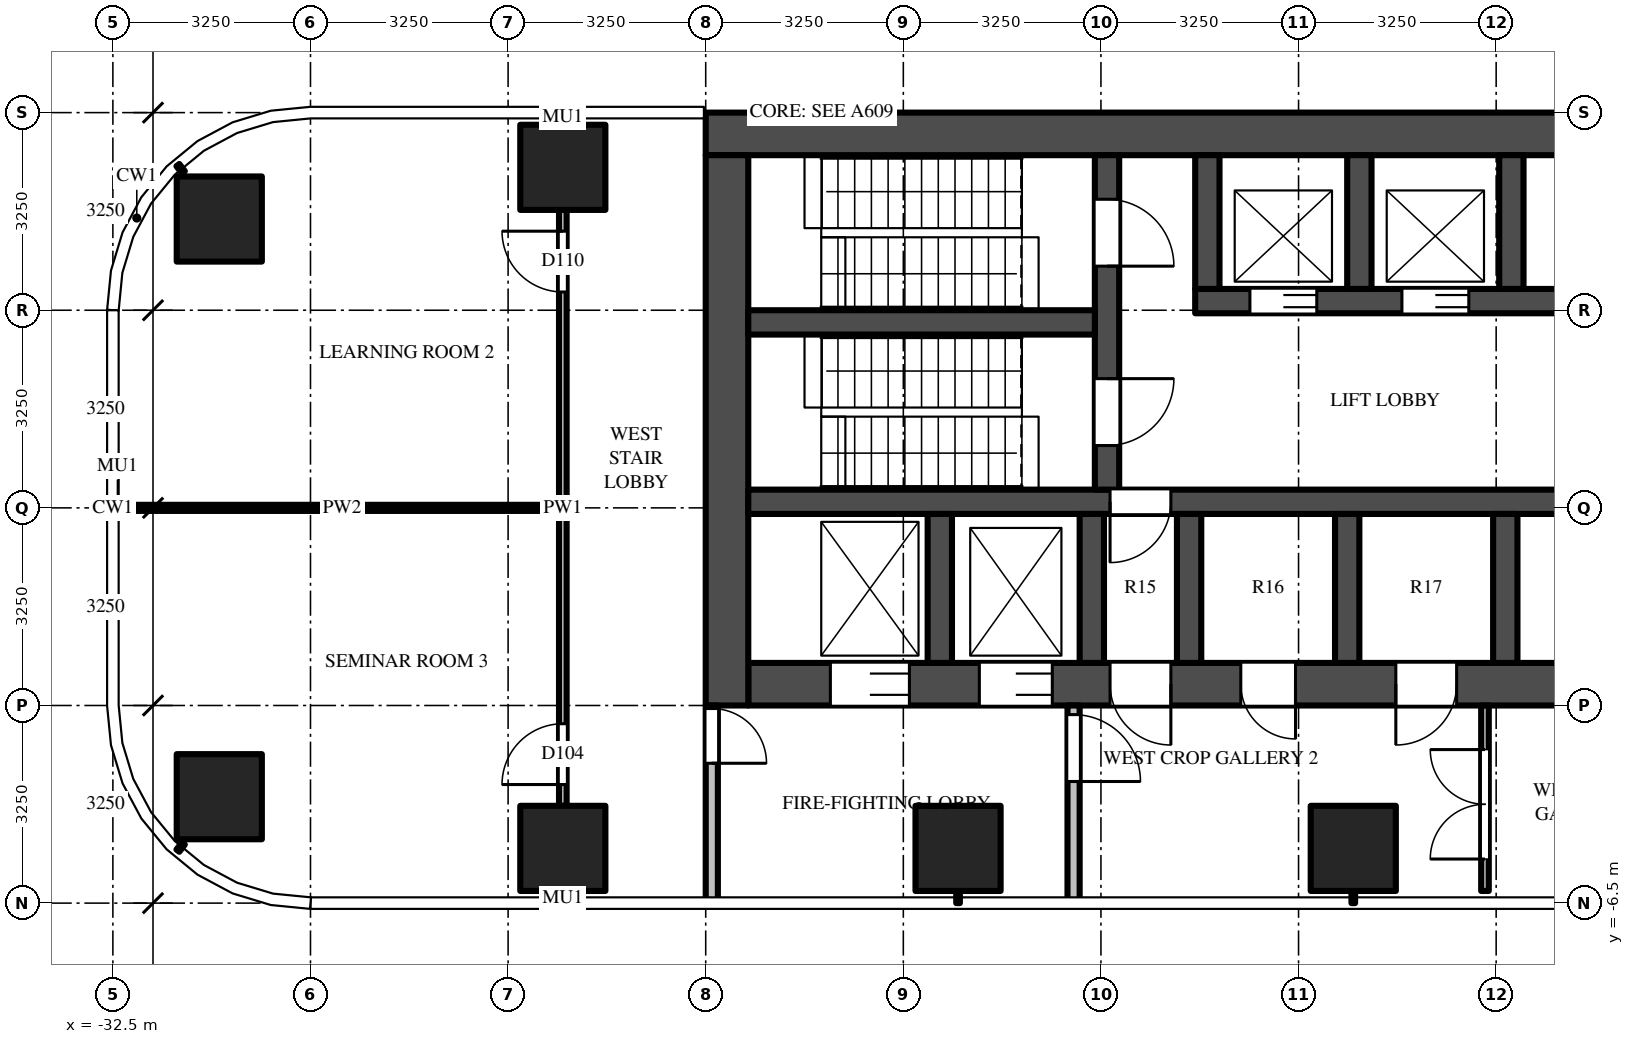
"""IFC4 building model, lengths in metres.
Left out: names, types, materials, properties, quantities, classifications, styles, units other than length and angle.
Written with IfcOpenShell. Run it as: python <this file> out.ifc"""

import sys

from ifc_helpers import new_model, si_unit, direction, frame, frame_2d, origin, origin_2d, place, context, subcontext, project, spatial, polyline, rectangle, outline, extrude, source, transform, mapped, element, fill, save


model = new_model("IFC4")
c1 = context("Model", 3, precision=1e-05, world=origin(), true_north=direction((0.0, 1.0)))
c2 = subcontext(c1, "Body", "Model", "MODEL_VIEW")
j1 = project(units=[si_unit("LENGTHUNIT", "METRE"), si_unit("PLANEANGLEUNIT", "RADIAN")], contexts=[c1])
p1 = place(None, origin())
s1 = spatial("IfcSite", under=j1, at=p1, CompositionType="ELEMENT")
p2 = place(p1, origin())
s2 = spatial("IfcBuilding", under=s1, at=p2, CompositionType="ELEMENT")
p3 = place(p2, frame((0.0, 0.0, 65.5)))
s3 = spatial("IfcBuildingStorey", under=s2, at=p3, CompositionType="ELEMENT", Elevation=65.5)
m1 = source(origin(), c2, "Body", "SweptSolid", [
    extrude(rectangle(XDim=1.4, YDim=1.4, at=origin_2d()), origin(), (0.0, 0.0, 1.0), 4.5),
])
for number, where, z_axis, x_axis in (
    (1, (-12.1, -5.6, 0.0), (0.0, 0.0, 1.0), (1.0, 0.0, 0.0)),
    (2, (-18.6, -5.6, 0.0), (0.0, 0.0, 1.0), (1.0, 0.0, 0.0)),
    (3, (-25.1, -5.6, 0.0), (0.0, 0.0, 1.0), (1.0, 0.0, 0.0)),
    (4, (-30.75, -4.75, 0.0), (0.0, 0.0, 1.0), (1.0, 0.0, 0.0)),
    (5, (-25.1, 5.6, 0.0), (0.0, 0.0, 1.0), (1.0, 0.0, 0.0)),
    (6, (-30.75, 4.75, 0.0), (0.0, 0.0, 1.0), (1.0, 0.0, 0.0)),
):
    element("IfcColumn", number, at=place(p3, frame(where, z_axis=z_axis, x_axis=x_axis)), inside=s3, PredefinedType="COLUMN", context=c2, shape_type="MappedRepresentation", body=[
        mapped(m1, transform((0.0, 0.0, 0.0))),
    ])
m2 = source(origin(), c2, "Body", "SweptSolid", [
    extrude(rectangle(XDim=16.45, YDim=0.7, at=frame_2d((8.225, 0.0))), origin(), (0.0, 0.0, 1.0), 4.25),
])
p4 = place(p3, frame((-6.3, 6.15, 0.0), z_axis=(0.0, 0.0, 1.0), x_axis=(-1.0, 0.0, 0.0)))
e7 = element("IfcWall", 7, at=p4, inside=s3, PredefinedType="SHEAR", context=c2, shape_type="MappedRepresentation", body=[
    mapped(m2, transform((0.0, 0.0, 0.0))),
])
m3 = source(origin(), c2, "Body", "SweptSolid", [
    extrude(rectangle(XDim=14.85, YDim=0.7, at=frame_2d((7.425, 0.0))), origin(), (0.0, 0.0, 1.0), 4.25),
])
p5 = place(p3, frame((-7.2, -2.9, 0.0), z_axis=(0.0, 0.0, 1.0), x_axis=(-1.0, 0.0, 0.0)))
e8 = element("IfcWall", 8, at=p5, inside=s3, PredefinedType="SHEAR", context=c2, shape_type="MappedRepresentation", body=[
    mapped(m3, transform((0.0, 0.0, 0.0))),
])
m4 = source(origin(), c2, "Body", "SweptSolid", [
    extrude(rectangle(XDim=1.3, YDim=2.1, at=frame_2d((0.65, 1.05))), frame((0.0, 0.36, 0.0), z_axis=(0.0, -1.0, 0.0), x_axis=(1.0, 0.0, 0.0)), (0.0, 0.0, 1.0), 0.72),
])
p6 = place(p5, frame((12.2, 0.0, 0.0)))
e9 = element("IfcOpeningElement", 9, at=p6, cuts=e8, PredefinedType="OPENING", context=c2, shape_type="MappedRepresentation", body=[
    mapped(m4, transform((0.0, 0.0, 0.0))),
])
m5 = source(origin(), c2, "Body", "SweptSolid", [
    extrude(rectangle(XDim=1.2, YDim=2.1, at=frame_2d((0.6, 1.05))), frame((0.0, 0.36, 0.0), z_axis=(0.0, -1.0, 0.0), x_axis=(1.0, 0.0, 0.0)), (0.0, 0.0, 1.0), 0.72),
])
p7 = place(p5, frame((9.85, 0.0, 0.0)))
e10 = element("IfcOpeningElement", 10, at=p7, cuts=e8, PredefinedType="OPENING", context=c2, shape_type="MappedRepresentation", body=[
    mapped(m5, transform((0.0, 0.0, 0.0))),
])
m6 = source(origin(), c2, "Body", "SweptSolid", [
    extrude(rectangle(XDim=1.0, YDim=2.1, at=frame_2d((0.5, 1.05))), frame((0.0, 0.36, 0.0), z_axis=(0.0, -1.0, 0.0), x_axis=(1.0, 0.0, 0.0)), (0.0, 0.0, 1.0), 0.72),
])
p8 = place(p5, frame((7.9, 0.0, 0.0)))
e11 = element("IfcOpeningElement", 11, at=p8, cuts=e8, PredefinedType="OPENING", context=c2, shape_type="MappedRepresentation", body=[
    mapped(m6, transform((0.0, 0.0, 0.0))),
])
m7 = source(origin(), c2, "Body", "SweptSolid", [
    extrude(rectangle(XDim=0.9, YDim=2.1, at=frame_2d((0.45, 1.05))), frame((0.0, 0.36, 0.0), z_axis=(0.0, -1.0, 0.0), x_axis=(1.0, 0.0, 0.0)), (0.0, 0.0, 1.0), 0.72),
])
p9 = place(p5, frame((0.65, 0.0, 0.0)))
e12 = element("IfcOpeningElement", 12, at=p9, cuts=e8, PredefinedType="OPENING", context=c2, shape_type="MappedRepresentation", body=[
    mapped(m7, transform((0.0, 0.0, 0.0))),
])
p10 = place(p5, frame((3.2, 0.0, 0.0)))
e13 = element("IfcOpeningElement", 13, at=p10, cuts=e8, PredefinedType="OPENING", context=c2, shape_type="MappedRepresentation", body=[
    mapped(m6, transform((0.0, 0.0, 0.0))),
])
p11 = place(p5, frame((5.85, 0.0, 0.0)))
e14 = element("IfcOpeningElement", 14, at=p11, cuts=e8, PredefinedType="OPENING", context=c2, shape_type="MappedRepresentation", body=[
    mapped(m7, transform((0.0, 0.0, 0.0))),
])
m8 = source(origin(), c2, "Body", "SweptSolid", [
    extrude(rectangle(XDim=9.05, YDim=0.7, at=frame_2d((4.525, 0.0))), origin(), (0.0, 0.0, 1.0), 4.25),
])
p12 = place(p3, frame((-22.4, 5.8, 0.0), z_axis=(0.0, 0.0, 1.0), x_axis=(0.0, -1.0, 0.0)))
e15 = element("IfcWall", 15, at=p12, inside=s3, PredefinedType="SHEAR", context=c2, shape_type="MappedRepresentation", body=[
    mapped(m8, transform((0.0, 0.0, 0.0))),
])
m9 = source(origin(), c2, "Body", "SweptSolid", [
    extrude(rectangle(XDim=7.5, YDim=0.4, at=frame_2d((3.75, 0.0))), origin(), (0.0, 0.0, 1.0), 4.25),
])
p13 = place(p3, frame((-7.2, 3.4, 0.0), z_axis=(0.0, 0.0, 1.0), x_axis=(-1.0, 0.0, 0.0)))
e16 = element("IfcWall", 16, at=p13, inside=s3, PredefinedType="SHEAR", context=c2, shape_type="MappedRepresentation", body=[
    mapped(m9, transform((0.0, 0.0, 0.0))),
])
m10 = source(origin(), c2, "Body", "SweptSolid", [
    extrude(rectangle(XDim=1.1, YDim=2.1, at=frame_2d((0.55, 1.05))), frame((0.0, 0.21, 0.0), z_axis=(0.0, -1.0, 0.0), x_axis=(1.0, 0.0, 0.0)), (0.0, 0.0, 1.0), 0.42),
])
p14 = place(p13, frame((3.0, 0.0, 0.0)))
e17 = element("IfcOpeningElement", 17, at=p14, cuts=e16, PredefinedType="OPENING", context=c2, shape_type="MappedRepresentation", body=[
    mapped(m10, transform((0.0, 0.0, 0.0))),
])
p15 = place(p13, frame((5.5, 0.0, 0.0)))
e18 = element("IfcOpeningElement", 18, at=p15, cuts=e16, PredefinedType="OPENING", context=c2, shape_type="MappedRepresentation", body=[
    mapped(m10, transform((0.0, 0.0, 0.0))),
])
m11 = source(origin(), c2, "Body", "SweptSolid", [
    extrude(rectangle(XDim=14.85, YDim=0.4, at=frame_2d((7.425, 0.0))), origin(), (0.0, 0.0, 1.0), 4.25),
])
p16 = place(p3, frame((-7.2, 0.1, 0.0), z_axis=(0.0, 0.0, 1.0), x_axis=(-1.0, 0.0, 0.0)))
e19 = element("IfcWall", 19, at=p16, inside=s3, PredefinedType="SHEAR", context=c2, shape_type="MappedRepresentation", body=[
    mapped(m11, transform((0.0, 0.0, 0.0))),
])
m12 = source(origin(), c2, "Body", "SweptSolid", [
    extrude(rectangle(XDim=1.0, YDim=2.1, at=frame_2d((0.5, 1.05))), frame((0.0, 0.21, 0.0), z_axis=(0.0, -1.0, 0.0), x_axis=(1.0, 0.0, 0.0)), (0.0, 0.0, 1.0), 0.42),
])
p17 = place(p16, frame((7.9, 0.0, 0.0)))
e20 = element("IfcOpeningElement", 20, at=p17, cuts=e19, PredefinedType="OPENING", context=c2, shape_type="MappedRepresentation", body=[
    mapped(m12, transform((0.0, 0.0, 0.0))),
])
m13 = source(origin(), c2, "Body", "SweptSolid", [
    extrude(rectangle(XDim=5.5, YDim=0.4, at=frame_2d((2.75, 0.0))), origin(), (0.0, 0.0, 1.0), 4.25),
])
p18 = place(p3, frame((-16.15, 5.8, 0.0), z_axis=(0.0, 0.0, 1.0), x_axis=(0.0, -1.0, 0.0)))
e21 = element("IfcWall", 21, at=p18, inside=s3, PredefinedType="SHEAR", context=c2, shape_type="MappedRepresentation", body=[
    mapped(m13, transform((0.0, 0.0, 0.0))),
])
p19 = place(p18, frame((0.725, 0.0, 0.0)))
e22 = element("IfcOpeningElement", 22, at=p19, cuts=e21, PredefinedType="OPENING", context=c2, shape_type="MappedRepresentation", body=[
    mapped(m10, transform((0.0, 0.0, 0.0))),
])
p20 = place(p18, frame((3.675, 0.0, 0.0)))
e23 = element("IfcOpeningElement", 23, at=p20, cuts=e21, PredefinedType="OPENING", context=c2, shape_type="MappedRepresentation", body=[
    mapped(m10, transform((0.0, 0.0, 0.0))),
])
m14 = source(origin(), c2, "Body", "SweptSolid", [
    extrude(rectangle(XDim=5.7, YDim=0.4, at=frame_2d((2.85, 0.0))), origin(), (0.0, 0.0, 1.0), 4.25),
])
p21 = place(p3, frame((-16.35, 3.05, 0.0), z_axis=(0.0, 0.0, 1.0), x_axis=(-1.0, 0.0, 0.0)))
e24 = element("IfcWall", 24, at=p21, inside=s3, PredefinedType="SHEAR", context=c2, shape_type="MappedRepresentation", body=[
    mapped(m14, transform((0.0, 0.0, 0.0))),
])
m15 = source(origin(), c2, "Body", "SweptSolid", [
    extrude(rectangle(XDim=2.2, YDim=0.4, at=frame_2d((1.1, 0.0))), origin(), (0.0, 0.0, 1.0), 4.25),
])
for number, where, z_axis, x_axis in (
    (25, (-9.5, 5.8, 0.0), (0.0, 0.0, 1.0), (0.0, -1.0, 0.0)),
    (26, (-12.0, 5.8, 0.0), (0.0, 0.0, 1.0), (0.0, -1.0, 0.0)),
    (27, (-14.5, 5.8, 0.0), (0.0, 0.0, 1.0), (0.0, -1.0, 0.0)),
):
    element("IfcWall", number, at=place(p3, frame(where, z_axis=z_axis, x_axis=x_axis)), inside=s3, PredefinedType="SHEAR", context=c2, shape_type="MappedRepresentation", body=[
        mapped(m15, transform((0.0, 0.0, 0.0))),
    ])
m16 = source(origin(), c2, "Body", "SweptSolid", [
    extrude(rectangle(XDim=2.45, YDim=0.4, at=frame_2d((1.225, 0.0))), origin(), (0.0, 0.0, 1.0), 4.25),
])
for number, where, z_axis, x_axis in (
    (28, (-9.6, -0.1, 0.0), (0.0, 0.0, 1.0), (0.0, -1.0, 0.0)),
    (29, (-12.2, -0.1, 0.0), (0.0, 0.0, 1.0), (0.0, -1.0, 0.0)),
    (30, (-14.8, -0.1, 0.0), (0.0, 0.0, 1.0), (0.0, -1.0, 0.0)),
    (31, (-16.4, -0.1, 0.0), (0.0, 0.0, 1.0), (0.0, -1.0, 0.0)),
    (32, (-18.9, -0.1, 0.0), (0.0, 0.0, 1.0), (0.0, -1.0, 0.0)),
):
    element("IfcWall", number, at=place(p3, frame(where, z_axis=z_axis, x_axis=x_axis)), inside=s3, PredefinedType="SHEAR", context=c2, shape_type="MappedRepresentation", body=[
        mapped(m16, transform((0.0, 0.0, 0.0))),
    ])
m17 = source(origin(), c2, "Body", "SweptSolid", [
    extrude(rectangle(XDim=3.25, YDim=0.2, at=frame_2d((1.625, 0.0))), origin(), (0.0, 0.0, 1.0), 4.25),
])
p22 = place(p3, frame((-16.7, -3.25, 0.0), z_axis=(0.0, 0.0, 1.0), x_axis=(0.0, -1.0, 0.0)))
e33 = element("IfcWall", 33, at=p22, inside=s3, PredefinedType="PARTITIONING", context=c2, shape_type="MappedRepresentation", body=[
    mapped(m17, transform((0.0, 0.0, 0.0))),
])
m18 = source(origin(), c2, "Body", "SweptSolid", [
    extrude(rectangle(XDim=1.1, YDim=2.1, at=frame_2d((0.55, 1.05))), frame((0.0, 0.11, 0.0), z_axis=(0.0, -1.0, 0.0), x_axis=(1.0, 0.0, 0.0)), (0.0, 0.0, 1.0), 0.22),
])
p23 = place(p22, frame((0.15, 0.0, 0.0)))
e34 = element("IfcOpeningElement", 34, at=p23, cuts=e33, PredefinedType="OPENING", context=c2, shape_type="MappedRepresentation", body=[
    mapped(m18, transform((0.0, 0.0, 0.0))),
])
p24 = place(p3, frame((-22.65, -3.25, 0.0), z_axis=(0.0, 0.0, 1.0), x_axis=(0.0, -1.0, 0.0)))
e35 = element("IfcWall", 35, at=p24, inside=s3, PredefinedType="PARTITIONING", context=c2, shape_type="MappedRepresentation", body=[
    mapped(m17, transform((0.0, 0.0, 0.0))),
])
m19 = source(origin(), c2, "Body", "SweptSolid", [
    extrude(rectangle(XDim=0.9, YDim=2.1, at=frame_2d((0.45, 1.05))), frame((0.0, 0.11, 0.0), z_axis=(0.0, -1.0, 0.0), x_axis=(1.0, 0.0, 0.0)), (0.0, 0.0, 1.0), 0.22),
])
p25 = place(p24, frame((0.05, 0.0, 0.0)))
e36 = element("IfcOpeningElement", 36, at=p25, cuts=e35, PredefinedType="OPENING", context=c2, shape_type="MappedRepresentation", body=[
    mapped(m19, transform((0.0, 0.0, 0.0))),
])
p26 = place(p3, origin())
e37 = element("IfcWall", 37, at=p26, inside=s3, PredefinedType="USERDEFINED", context=c2, shape_type="SweptSolid", body=[
    extrude(outline(polyline([(-31.256, 8.48), (-29.658, 8.692), (-29.531, 8.663), (-29.667, 8.078), (-31.059, 7.901), (-32.211, 7.236), (-32.527, 6.826), (-33.002, 7.193), (-32.614, 7.696), (-31.256, 8.48)])), origin(), (0.0, 0.0, 1.0), 0.5),
])
m20 = source(origin(), c2, "Body", "SweptSolid", [
    extrude(rectangle(XDim=9.8, YDim=0.125, at=frame_2d((4.9, 0.0))), origin(), (0.0, 0.0, 1.0), 3.468),
])
p27 = place(p3, frame((-25.1, -4.9, 0.0), z_axis=(0.0, 0.0, 1.0), x_axis=(0.0, 1.0, 0.0)))
e38 = element("IfcWall", 38, at=p27, inside=s3, PredefinedType="PARTITIONING", context=c2, shape_type="MappedRepresentation", body=[
    mapped(m20, transform((0.0, 0.0, 0.0))),
])
m21 = source(origin(), c2, "Body", "SweptSolid", [
    extrude(rectangle(XDim=1.0, YDim=2.1, at=frame_2d((0.5, 1.05))), frame((0.0, 0.073, 0.0), z_axis=(0.0, -1.0, 0.0), x_axis=(1.0, 0.0, 0.0)), (0.0, 0.0, 1.0), 0.145),
])
p28 = place(p27, frame((0.35, 0.0, 0.0)))
e39 = element("IfcOpeningElement", 39, at=p28, cuts=e38, PredefinedType="OPENING", context=c2, shape_type="MappedRepresentation", body=[
    mapped(m21, transform((0.0, 0.0, 0.0))),
])
p29 = place(p27, frame((8.45, 0.0, 0.0)))
e40 = element("IfcOpeningElement", 40, at=p29, cuts=e38, PredefinedType="OPENING", context=c2, shape_type="MappedRepresentation", body=[
    mapped(m21, transform((0.0, 0.0, 0.0))),
])
m22 = source(origin(), c2, "Body", "SweptSolid", [
    extrude(rectangle(XDim=3.05, YDim=0.125, at=frame_2d((1.525, 0.0))), origin(), (0.0, 0.0, 1.0), 3.33),
])
p30 = place(p3, frame((-9.934, -6.3, 0.0), z_axis=(0.0, 0.0, 1.0), x_axis=(0.0, 1.0, 0.0)))
e41 = element("IfcWall", 41, at=p30, inside=s3, PredefinedType="PARTITIONING", context=c2, shape_type="MappedRepresentation", body=[
    mapped(m22, transform((0.0, 0.0, 0.0))),
])
m23 = source(origin(), c2, "Body", "SweptSolid", [
    extrude(rectangle(XDim=1.8, YDim=2.1, at=frame_2d((0.9, 1.05))), frame((0.0, 0.073, 0.0), z_axis=(0.0, -1.0, 0.0), x_axis=(1.0, 0.0, 0.0)), (0.0, 0.0, 1.0), 0.145),
])
p31 = place(p30, frame((0.525, 0.0, 0.0)))
e42 = element("IfcOpeningElement", 42, at=p31, cuts=e41, PredefinedType="OPENING", context=c2, shape_type="MappedRepresentation", body=[
    mapped(m23, transform((0.0, 0.0, 0.0))),
])
m24 = source(origin(), c2, "Body", "SweptSolid", [
    extrude(rectangle(XDim=7.137, YDim=0.1, at=frame_2d((3.569, 0.0))), origin(), (0.0, 0.0, 1.0), 3.33),
])
p32 = place(p3, frame((-32.3, 0.0, 0.0), z_axis=(0.0, 0.0, 1.0), x_axis=(1.0, 0.0, 0.0)))
e43 = element("IfcWall", 43, at=p32, inside=s3, PredefinedType="PARTITIONING", context=c2, shape_type="MappedRepresentation", body=[
    mapped(m24, transform((0.0, 0.0, 0.0))),
])
m25 = source(origin(), c2, "Body", "SweptSolid", [
    extrude(rectangle(XDim=1.1, YDim=2.1, at=frame_2d((0.55, 1.05))), frame((0.0, 0.025, 0.0), z_axis=(0.0, -1.0, 0.0), x_axis=(1.0, 0.0, 0.0)), (0.0, 0.0, 1.0), 0.05),
])
p33 = place(p14, origin())
e44 = element("IfcDoor", 44, at=p33, inside=s3, OperationType="DOUBLE_DOOR_SLIDING", PredefinedType="DOOR", context=c2, shape_type="MappedRepresentation", body=[
    mapped(m25, transform((0.0, 0.0, 0.0))),
])
fill(e17, e44)
p34 = place(p15, origin())
e45 = element("IfcDoor", 45, at=p34, inside=s3, OperationType="DOUBLE_DOOR_SLIDING", PredefinedType="DOOR", context=c2, shape_type="MappedRepresentation", body=[
    mapped(m25, transform((0.0, 0.0, 0.0))),
])
fill(e18, e45)
m26 = source(origin(), c2, "Body", "SweptSolid", [
    extrude(rectangle(XDim=1.3, YDim=2.1, at=frame_2d((0.65, 1.05))), frame((0.0, -0.275, 0.0), z_axis=(0.0, -1.0, 0.0), x_axis=(1.0, 0.0, 0.0)), (0.0, 0.0, 1.0), 0.05),
])
p35 = place(p6, origin())
e46 = element("IfcDoor", 46, at=p35, inside=s3, OperationType="DOUBLE_DOOR_SLIDING", PredefinedType="DOOR", context=c2, shape_type="MappedRepresentation", body=[
    mapped(m26, transform((0.0, 0.0, 0.0))),
])
fill(e9, e46)
m27 = source(origin(), c2, "Body", "SweptSolid", [
    extrude(rectangle(XDim=1.2, YDim=2.1, at=frame_2d((0.6, 1.05))), frame((0.0, -0.275, 0.0), z_axis=(0.0, -1.0, 0.0), x_axis=(1.0, 0.0, 0.0)), (0.0, 0.0, 1.0), 0.05),
])
p36 = place(p7, origin())
e47 = element("IfcDoor", 47, at=p36, inside=s3, OperationType="DOUBLE_DOOR_SLIDING", PredefinedType="DOOR", context=c2, shape_type="MappedRepresentation", body=[
    mapped(m27, transform((0.0, 0.0, 0.0))),
])
fill(e10, e47)
p37 = place(p19, origin())
e48 = element("IfcDoor", 48, at=p37, inside=s3, OperationType="SINGLE_SWING_RIGHT", PredefinedType="DOOR", context=c2, shape_type="MappedRepresentation", body=[
    mapped(m25, transform((0.0, 0.0, 0.0))),
])
fill(e22, e48)
p38 = place(p20, origin())
e49 = element("IfcDoor", 49, at=p38, inside=s3, OperationType="SINGLE_SWING_LEFT", PredefinedType="DOOR", context=c2, shape_type="MappedRepresentation", body=[
    mapped(m25, transform((0.0, 0.0, 0.0))),
])
fill(e23, e49)
m28 = source(origin(), c2, "Body", "SweptSolid", [
    extrude(rectangle(XDim=1.0, YDim=2.1, at=frame_2d((0.5, 1.05))), frame((0.0, 0.025, 0.0), z_axis=(0.0, -1.0, 0.0), x_axis=(1.0, 0.0, 0.0)), (0.0, 0.0, 1.0), 0.05),
])
p39 = place(p17, origin())
e50 = element("IfcDoor", 50, at=p39, inside=s3, OperationType="SINGLE_SWING_RIGHT", PredefinedType="DOOR", context=c2, shape_type="MappedRepresentation", body=[
    mapped(m28, transform((0.0, 0.0, 0.0))),
])
fill(e20, e50)
m29 = source(origin(), c2, "Body", "SweptSolid", [
    extrude(rectangle(XDim=1.0, YDim=2.1, at=frame_2d((0.5, 1.05))), frame((0.0, -0.275, 0.0), z_axis=(0.0, -1.0, 0.0), x_axis=(1.0, 0.0, 0.0)), (0.0, 0.0, 1.0), 0.05),
])
p40 = place(p8, origin())
e51 = element("IfcDoor", 51, at=p40, inside=s3, OperationType="SINGLE_SWING_LEFT", PredefinedType="DOOR", context=c2, shape_type="MappedRepresentation", body=[
    mapped(m29, transform((0.0, 0.0, 0.0))),
])
fill(e11, e51)
p41 = place(p23, origin())
e52 = element("IfcDoor", 52, at=p41, inside=s3, OperationType="SINGLE_SWING_RIGHT", PredefinedType="DOOR", context=c2, shape_type="MappedRepresentation", body=[
    mapped(m25, transform((0.0, 0.0, 0.0))),
])
fill(e34, e52)
m30 = source(origin(), c2, "Body", "SweptSolid", [
    extrude(rectangle(XDim=0.9, YDim=2.1, at=frame_2d((0.45, 1.05))), frame((0.0, 0.025, 0.0), z_axis=(0.0, -1.0, 0.0), x_axis=(1.0, 0.0, 0.0)), (0.0, 0.0, 1.0), 0.05),
])
p42 = place(p25, origin())
e53 = element("IfcDoor", 53, at=p42, inside=s3, OperationType="SINGLE_SWING_RIGHT", PredefinedType="DOOR", context=c2, shape_type="MappedRepresentation", body=[
    mapped(m30, transform((0.0, 0.0, 0.0))),
])
fill(e36, e53)
p43 = place(p10, origin())
e54 = element("IfcDoor", 54, at=p43, inside=s3, OperationType="SINGLE_SWING_RIGHT", PredefinedType="DOOR", context=c2, shape_type="MappedRepresentation", body=[
    mapped(m29, transform((0.0, 0.0, 0.0))),
])
fill(e13, e54)
m31 = source(origin(), c2, "Body", "SweptSolid", [
    extrude(rectangle(XDim=0.9, YDim=2.1, at=frame_2d((0.45, 1.05))), frame((0.0, -0.275, 0.0), z_axis=(0.0, -1.0, 0.0), x_axis=(1.0, 0.0, 0.0)), (0.0, 0.0, 1.0), 0.05),
])
p44 = place(p11, origin())
e55 = element("IfcDoor", 55, at=p44, inside=s3, OperationType="SINGLE_SWING_LEFT", PredefinedType="DOOR", context=c2, shape_type="MappedRepresentation", body=[
    mapped(m31, transform((0.0, 0.0, 0.0))),
])
fill(e14, e55)
m32 = source(origin(), c2, "Body", "SweptSolid", [
    extrude(rectangle(XDim=1.8, YDim=2.1, at=frame_2d((0.9, 1.05))), frame((0.0, 0.025, 0.0), z_axis=(0.0, -1.0, 0.0), x_axis=(1.0, 0.0, 0.0)), (0.0, 0.0, 1.0), 0.05),
])
p45 = place(p31, origin())
e56 = element("IfcDoor", 56, at=p45, inside=s3, OperationType="DOUBLE_DOOR_SINGLE_SWING", PredefinedType="DOOR", context=c2, shape_type="MappedRepresentation", body=[
    mapped(m32, transform((0.0, 0.0, 0.0))),
])
fill(e42, e56)
p46 = place(p28, origin())
e57 = element("IfcDoor", 57, at=p46, inside=s3, OperationType="SINGLE_SWING_LEFT", PredefinedType="DOOR", context=c2, shape_type="MappedRepresentation", body=[
    mapped(m28, transform((0.0, 0.0, 0.0))),
])
fill(e39, e57)
p47 = place(p29, origin())
e58 = element("IfcDoor", 58, at=p47, inside=s3, OperationType="SINGLE_SWING_RIGHT", PredefinedType="DOOR", context=c2, shape_type="MappedRepresentation", body=[
    mapped(m28, transform((0.0, 0.0, 0.0))),
])
fill(e40, e58)
save(model, sys.argv[1])
